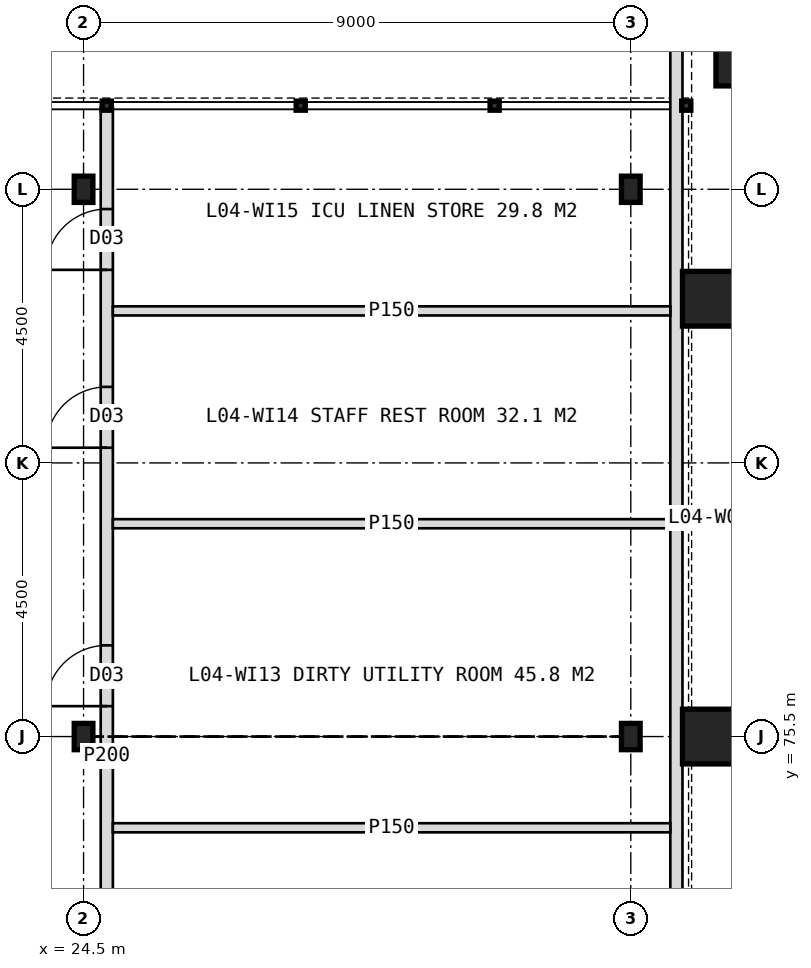
"""IFC4 building model, lengths in metres.
Left out: names, types, materials, properties, quantities, classifications, styles, units other than length and angle.
Written with IfcOpenShell. Run it as: python <this file> out.ifc"""

import sys

from ifc_helpers import new_model, si_unit, direction, frame, frame_2d, origin, origin_2d, place, context, subcontext, project, spatial, rectangle, hollow_rectangle, i_section, extrude, element, fill, save


model = new_model("IFC4")
c1 = context("Model", 3, precision=1e-05, world=origin(), true_north=direction((0.0, 1.0)))
c2 = subcontext(c1, "Body", "Model", "MODEL_VIEW")
j1 = project(units=[si_unit("LENGTHUNIT", "METRE"), si_unit("PLANEANGLEUNIT", "RADIAN")], contexts=[c1])
p1 = place(None, origin())
s1 = spatial("IfcSite", under=j1, at=p1, CompositionType="ELEMENT")
p2 = place(p1, origin())
s2 = spatial("IfcBuilding", under=s1, at=p2, CompositionType="ELEMENT")
p3 = place(p2, frame((0.0, 0.0, 21.0)))
s3 = spatial("IfcBuildingStorey", under=s2, at=p3, CompositionType="ELEMENT", Elevation=21.0)
for number, where, z_axis, x_axis in (
    (1, (34.8, 75.5, 0.0), (0.0, 0.0, 1.0), (1.0, 0.0, 0.0)),
    (2, (34.8, 82.7, 0.0), (0.0, 0.0, 1.0), (1.0, 0.0, 0.0)),
    (3, (35.35, 86.65, 0.0), (0.0, 0.0, 1.0), (1.0, 0.0, 0.0)),
):
    element("IfcColumn", number, at=place(p3, frame(where, z_axis=z_axis, x_axis=x_axis)), inside=s3, PredefinedType="COLUMN", context=c2, shape_type="SweptSolid", body=[
        extrude(hollow_rectangle(XDim=0.9, YDim=0.9, WallThickness=0.08, at=origin_2d()), origin(), (0.0, 0.0, 1.0), 5.0),
    ])
for number, where, z_axis, x_axis in (
    (4, (24.5, 75.5, 0.0), (0.0, 0.0, 1.0), (1.0, 0.0, 0.0)),
    (5, (24.5, 84.5, 0.0), (0.0, 0.0, 1.0), (1.0, 0.0, 0.0)),
    (6, (33.5, 75.5, 0.0), (0.0, 0.0, 1.0), (1.0, 0.0, 0.0)),
    (7, (33.5, 84.5, 0.0), (0.0, 0.0, 1.0), (1.0, 0.0, 0.0)),
):
    element("IfcColumn", number, at=place(p3, frame(where, z_axis=z_axis, x_axis=x_axis)), inside=s3, PredefinedType="COLUMN", context=c2, shape_type="SweptSolid", body=[
        extrude(i_section(OverallWidth=0.307, OverallDepth=0.432, WebThickness=0.021, FlangeThickness=0.04, FilletRadius=0.027, at=origin_2d()), origin(), (0.0, 0.0, 1.0), 5.0),
    ])
p4 = place(p3, frame((24.882, 64.5, 0.0), z_axis=(0.0, 0.0, 1.0), x_axis=(0.0, 1.0, 0.0)))
e8 = element("IfcWall", 8, at=p4, inside=s3, PredefinedType="PARTITIONING", context=c2, shape_type="SweptSolid", body=[
    extrude(rectangle(XDim=21.35, YDim=0.2, at=frame_2d((10.675, 0.0))), origin(), (0.0, 0.0, 1.0), 4.7),
])
p5 = place(p4, frame((2.5, 0.0, 0.0)))
e9 = element("IfcOpeningElement", 9, at=p5, cuts=e8, PredefinedType="OPENING", context=c2, shape_type="SweptSolid", body=[
    extrude(rectangle(XDim=1.0, YDim=2.1, at=frame_2d((0.5, 1.05))), frame((0.0, 0.11, 0.0), z_axis=(0.0, -1.0, 0.0), x_axis=(1.0, 0.0, 0.0)), (0.0, 0.0, 1.0), 0.22),
])
p6 = place(p4, frame((7.25, 0.0, 0.0)))
e10 = element("IfcOpeningElement", 10, at=p6, cuts=e8, PredefinedType="OPENING", context=c2, shape_type="SweptSolid", body=[
    extrude(rectangle(XDim=1.0, YDim=2.1, at=frame_2d((0.5, 1.05))), frame((0.0, 0.11, 0.0), z_axis=(0.0, -1.0, 0.0), x_axis=(1.0, 0.0, 0.0)), (0.0, 0.0, 1.0), 0.22),
])
p7 = place(p4, frame((11.5, 0.0, 0.0)))
e11 = element("IfcOpeningElement", 11, at=p7, cuts=e8, PredefinedType="OPENING", context=c2, shape_type="SweptSolid", body=[
    extrude(rectangle(XDim=1.0, YDim=2.1, at=frame_2d((0.5, 1.05))), frame((0.0, 0.11, 0.0), z_axis=(0.0, -1.0, 0.0), x_axis=(1.0, 0.0, 0.0)), (0.0, 0.0, 1.0), 0.22),
])
p8 = place(p4, frame((15.75, 0.0, 0.0)))
e12 = element("IfcOpeningElement", 12, at=p8, cuts=e8, PredefinedType="OPENING", context=c2, shape_type="SweptSolid", body=[
    extrude(rectangle(XDim=1.0, YDim=2.1, at=frame_2d((0.5, 1.05))), frame((0.0, 0.11, 0.0), z_axis=(0.0, -1.0, 0.0), x_axis=(1.0, 0.0, 0.0)), (0.0, 0.0, 1.0), 0.22),
])
p9 = place(p4, frame((18.675, 0.0, 0.0)))
e13 = element("IfcOpeningElement", 13, at=p9, cuts=e8, PredefinedType="OPENING", context=c2, shape_type="SweptSolid", body=[
    extrude(rectangle(XDim=1.0, YDim=2.1, at=frame_2d((0.5, 1.05))), frame((0.0, 0.11, 0.0), z_axis=(0.0, -1.0, 0.0), x_axis=(1.0, 0.0, 0.0)), (0.0, 0.0, 1.0), 0.22),
])
p10 = place(p3, frame((34.25, 36.8, 0.0), z_axis=(0.0, 0.0, 1.0), x_axis=(0.0, 1.0, 0.0)))
e14 = element("IfcWall", 14, at=p10, inside=s3, PredefinedType="SOLIDWALL", context=c2, shape_type="SweptSolid", body=[
    extrude(rectangle(XDim=50.4, YDim=0.2, at=frame_2d((25.2, 0.0))), origin(), (0.0, 0.0, 1.0), 4.7),
])
p11 = place(p10, frame((6.25, 0.0, 0.0)))
e15 = element("IfcOpeningElement", 15, at=p11, cuts=e14, PredefinedType="OPENING", context=c2, shape_type="SweptSolid", body=[
    extrude(rectangle(XDim=1.8, YDim=2.2, at=frame_2d((0.9, 1.1))), frame((0.0, 0.11, 0.0), z_axis=(0.0, -1.0, 0.0), x_axis=(1.0, 0.0, 0.0)), (0.0, 0.0, 1.0), 0.22),
])
p12 = place(p10, frame((25.55, 0.0, 0.0)))
e16 = element("IfcOpeningElement", 16, at=p12, cuts=e14, PredefinedType="OPENING", context=c2, shape_type="SweptSolid", body=[
    extrude(rectangle(XDim=1.8, YDim=2.2, at=frame_2d((0.9, 1.1))), frame((0.0, 0.11, 0.0), z_axis=(0.0, -1.0, 0.0), x_axis=(1.0, 0.0, 0.0)), (0.0, 0.0, 1.0), 0.22),
])
for number, where, z_axis, x_axis in (
    (17, (24.982, 74.0, 0.0), (0.0, 0.0, 1.0), (1.0, 0.0, 0.0)),
    (18, (24.982, 79.0, 0.0), (0.0, 0.0, 1.0), (1.0, 0.0, 0.0)),
    (19, (24.982, 82.5, 0.0), (0.0, 0.0, 1.0), (1.0, 0.0, 0.0)),
):
    element("IfcWall", number, at=place(p3, frame(where, z_axis=z_axis, x_axis=x_axis)), inside=s3, PredefinedType="PARTITIONING", context=c2, shape_type="SweptSolid", body=[
        extrude(rectangle(XDim=9.168, YDim=0.15, at=frame_2d((4.584, 0.0))), origin(), (0.0, 0.0, 1.0), 4.7),
    ])
p13 = place(p7, origin())
e20 = element("IfcDoor", 20, at=p13, inside=s3, OperationType="SINGLE_SWING_LEFT", PredefinedType="DOOR", context=c2, shape_type="SweptSolid", body=[
    extrude(rectangle(XDim=1.0, YDim=2.1, at=frame_2d((0.5, 1.05))), frame((0.0, 0.025, 0.0), z_axis=(0.0, -1.0, 0.0), x_axis=(1.0, 0.0, 0.0)), (0.0, 0.0, 1.0), 0.05),
])
fill(e11, e20)
p14 = place(p8, origin())
e21 = element("IfcDoor", 21, at=p14, inside=s3, OperationType="SINGLE_SWING_LEFT", PredefinedType="DOOR", context=c2, shape_type="SweptSolid", body=[
    extrude(rectangle(XDim=1.0, YDim=2.1, at=frame_2d((0.5, 1.05))), frame((0.0, 0.025, 0.0), z_axis=(0.0, -1.0, 0.0), x_axis=(1.0, 0.0, 0.0)), (0.0, 0.0, 1.0), 0.05),
])
fill(e12, e21)
p15 = place(p9, origin())
e22 = element("IfcDoor", 22, at=p15, inside=s3, OperationType="SINGLE_SWING_LEFT", PredefinedType="DOOR", context=c2, shape_type="SweptSolid", body=[
    extrude(rectangle(XDim=1.0, YDim=2.1, at=frame_2d((0.5, 1.05))), frame((0.0, 0.025, 0.0), z_axis=(0.0, -1.0, 0.0), x_axis=(1.0, 0.0, 0.0)), (0.0, 0.0, 1.0), 0.05),
])
fill(e13, e22)
save(model, sys.argv[1])
